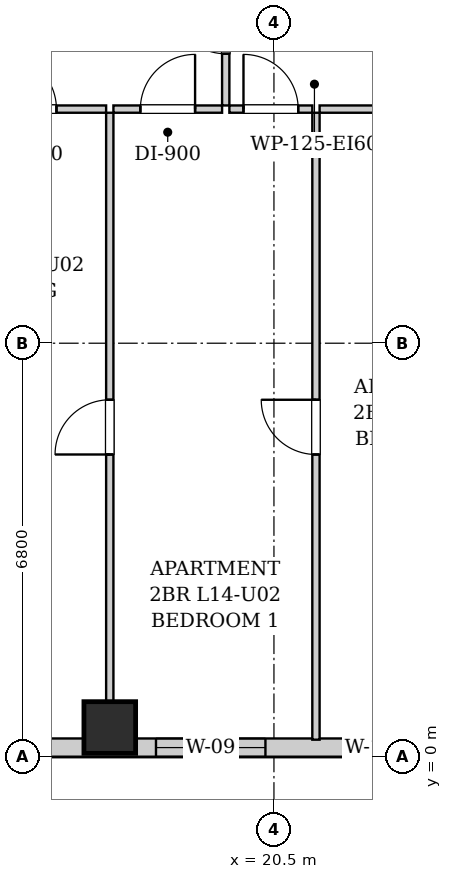
"""IFC4 building model, lengths in metres.
Left out: names, types, materials, properties, quantities, classifications, styles, units other than length and angle.
Written with IfcOpenShell. Run it as: python <this file> out.ifc"""

import sys

from ifc_helpers import new_model, si_unit, direction, frame, frame_2d, origin, origin_2d, place, context, subcontext, project, spatial, rectangle, extrude, element, fill, save


model = new_model("IFC4")
c1 = context("Model", 3, precision=1e-05, world=origin(), true_north=direction((0.0, 1.0)))
c2 = subcontext(c1, "Body", "Model", "MODEL_VIEW")
j1 = project(units=[si_unit("LENGTHUNIT", "METRE"), si_unit("PLANEANGLEUNIT", "RADIAN")], contexts=[c1])
p1 = place(None, origin())
s1 = spatial("IfcSite", under=j1, at=p1, CompositionType="ELEMENT")
p2 = place(p1, origin())
s2 = spatial("IfcBuilding", under=s1, at=p2, CompositionType="ELEMENT")
p3 = place(p2, frame((0.0, 0.0, 54.6)))
s3 = spatial("IfcBuildingStorey", under=s2, at=p3, CompositionType="ELEMENT", Elevation=54.6)
p4 = place(p3, frame((17.8, 0.48, 0.0), z_axis=(0.0, 0.0, 1.0), x_axis=(1.0, 0.0, 0.0)))
e1 = element("IfcColumn", 1, at=p4, inside=s3, PredefinedType="COLUMN", context=c2, shape_type="SweptSolid", body=[
    extrude(rectangle(XDim=0.85, YDim=0.85, at=origin_2d()), origin(), (0.0, 0.0, 1.0), 3.2),
])
p5 = place(p3, frame((44.0, 0.15, 0.0), z_axis=(0.0, 0.0, 1.0), x_axis=(-1.0, 0.0, 0.0)))
e2 = element("IfcWall", 2, at=p5, inside=s3, PredefinedType="SOLIDWALL", context=c2, shape_type="SweptSolid", body=[
    extrude(rectangle(XDim=27.55, YDim=0.3, at=frame_2d((13.775, 0.0))), origin(), (0.0, 0.0, 1.0), 1.975),
])
p6 = place(p5, frame((23.64, 0.0, 0.55)))
e3 = element("IfcOpeningElement", 3, at=p6, cuts=e2, PredefinedType="OPENING", context=c2, shape_type="SweptSolid", body=[
    extrude(rectangle(XDim=1.8, YDim=1.2, at=frame_2d((0.9, 0.6))), frame((0.0, 0.16, 0.0), z_axis=(0.0, -1.0, 0.0), x_axis=(1.0, 0.0, 0.0)), (0.0, 0.0, 1.0), 0.32),
])
p7 = place(p5, frame((21.5, 0.0, 0.55)))
e4 = element("IfcOpeningElement", 4, at=p7, cuts=e2, PredefinedType="OPENING", context=c2, shape_type="SweptSolid", body=[
    extrude(rectangle(XDim=0.85, YDim=1.2, at=frame_2d((0.425, 0.6))), frame((0.0, 0.16, 0.0), z_axis=(0.0, -1.0, 0.0), x_axis=(1.0, 0.0, 0.0)), (0.0, 0.0, 1.0), 0.32),
])
p8 = place(p5, frame((15.65, 0.0, 0.55)))
e5 = element("IfcOpeningElement", 5, at=p8, cuts=e2, PredefinedType="OPENING", context=c2, shape_type="SweptSolid", body=[
    extrude(rectangle(XDim=0.85, YDim=1.2, at=frame_2d((0.425, 0.6))), frame((0.0, 0.16, 0.0), z_axis=(0.0, -1.0, 0.0), x_axis=(1.0, 0.0, 0.0)), (0.0, 0.0, 1.0), 0.32),
])
p9 = place(p5, frame((12.875, 0.0, 0.55)))
e6 = element("IfcOpeningElement", 6, at=p9, cuts=e2, PredefinedType="OPENING", context=c2, shape_type="SweptSolid", body=[
    extrude(rectangle(XDim=1.8, YDim=1.2, at=frame_2d((0.9, 0.6))), frame((0.0, 0.16, 0.0), z_axis=(0.0, -1.0, 0.0), x_axis=(1.0, 0.0, 0.0)), (0.0, 0.0, 1.0), 0.32),
])
p10 = place(p5, frame((9.365, 0.0, 0.55)))
e7 = element("IfcOpeningElement", 7, at=p10, cuts=e2, PredefinedType="OPENING", context=c2, shape_type="SweptSolid", body=[
    extrude(rectangle(XDim=0.85, YDim=1.2, at=frame_2d((0.425, 0.6))), frame((0.0, 0.16, 0.0), z_axis=(0.0, -1.0, 0.0), x_axis=(1.0, 0.0, 0.0)), (0.0, 0.0, 1.0), 0.32),
])
p11 = place(p5, frame((6.477, 0.0, 0.55)))
e8 = element("IfcOpeningElement", 8, at=p11, cuts=e2, PredefinedType="OPENING", context=c2, shape_type="SweptSolid", body=[
    extrude(rectangle(XDim=1.8, YDim=1.2, at=frame_2d((0.9, 0.6))), frame((0.0, 0.16, 0.0), z_axis=(0.0, -1.0, 0.0), x_axis=(1.0, 0.0, 0.0)), (0.0, 0.0, 1.0), 0.32),
])
p12 = place(p5, frame((2.186, 0.0, 0.55)))
e9 = element("IfcOpeningElement", 9, at=p12, cuts=e2, PredefinedType="OPENING", context=c2, shape_type="SweptSolid", body=[
    extrude(rectangle(XDim=1.8, YDim=1.2, at=frame_2d((0.9, 0.6))), frame((0.0, 0.16, 0.0), z_axis=(0.0, -1.0, 0.0), x_axis=(1.0, 0.0, 0.0)), (0.0, 0.0, 1.0), 0.32),
])
p13 = place(p3, frame((19.707, 10.71, 0.0), z_axis=(0.0, 0.0, 1.0), x_axis=(0.0, 1.0, 0.0)))
e10 = element("IfcWall", 10, at=p13, inside=s3, PredefinedType="PARTITIONING", context=c2, shape_type="SweptSolid", body=[
    extrude(rectangle(XDim=2.6, YDim=0.12, at=frame_2d((1.3, 0.0))), origin(), (0.0, 0.0, 1.0), 2.94),
])
p14 = place(p13, frame((0.85, 0.0, 0.0)))
e11 = element("IfcOpeningElement", 11, at=p14, cuts=e10, PredefinedType="OPENING", context=c2, shape_type="SweptSolid", body=[
    extrude(rectangle(XDim=0.9, YDim=2.05, at=frame_2d((0.45, 1.025))), frame((0.0, 0.07, 0.0), z_axis=(0.0, -1.0, 0.0), x_axis=(1.0, 0.0, 0.0)), (0.0, 0.0, 1.0), 0.14),
])
p15 = place(p3, frame((15.207, 10.65, 0.0), z_axis=(0.0, 0.0, 1.0), x_axis=(1.0, 0.0, 0.0)))
e12 = element("IfcWall", 12, at=p15, inside=s3, PredefinedType="PARTITIONING", context=c2, shape_type="SweptSolid", body=[
    extrude(rectangle(XDim=2.533, YDim=0.12, at=frame_2d((1.267, 0.0))), origin(), (0.0, 0.0, 1.0), 2.94),
])
p16 = place(p15, frame((0.816, 0.0, 0.0)))
e13 = element("IfcOpeningElement", 13, at=p16, cuts=e12, PredefinedType="OPENING", context=c2, shape_type="SweptSolid", body=[
    extrude(rectangle(XDim=0.9, YDim=2.05, at=frame_2d((0.45, 1.025))), frame((0.0, 0.07, 0.0), z_axis=(0.0, -1.0, 0.0), x_axis=(1.0, 0.0, 0.0)), (0.0, 0.0, 1.0), 0.14),
])
p17 = place(p3, frame((17.86, 10.65, 0.0), z_axis=(0.0, 0.0, 1.0), x_axis=(1.0, 0.0, 0.0)))
e14 = element("IfcWall", 14, at=p17, inside=s3, PredefinedType="PARTITIONING", context=c2, shape_type="SweptSolid", body=[
    extrude(rectangle(XDim=1.787, YDim=0.12, at=frame_2d((0.894, 0.0))), origin(), (0.0, 0.0, 1.0), 2.94),
])
p18 = place(p17, frame((0.443, 0.0, 0.0)))
e15 = element("IfcOpeningElement", 15, at=p18, cuts=e14, PredefinedType="OPENING", context=c2, shape_type="SweptSolid", body=[
    extrude(rectangle(XDim=0.9, YDim=2.05, at=frame_2d((0.45, 1.025))), frame((0.0, 0.07, 0.0), z_axis=(0.0, -1.0, 0.0), x_axis=(1.0, 0.0, 0.0)), (0.0, 0.0, 1.0), 0.14),
])
p19 = place(p3, frame((19.767, 10.65, 0.0), z_axis=(0.0, 0.0, 1.0), x_axis=(1.0, 0.0, 0.0)))
e16 = element("IfcWall", 16, at=p19, inside=s3, PredefinedType="PARTITIONING", context=c2, shape_type="SweptSolid", body=[
    extrude(rectangle(XDim=1.364, YDim=0.12, at=frame_2d((0.682, 0.0))), origin(), (0.0, 0.0, 1.0), 2.94),
])
p20 = place(p19, frame((0.232, 0.0, 0.0)))
e17 = element("IfcOpeningElement", 17, at=p20, cuts=e16, PredefinedType="OPENING", context=c2, shape_type="SweptSolid", body=[
    extrude(rectangle(XDim=0.9, YDim=2.05, at=frame_2d((0.45, 1.025))), frame((0.0, 0.07, 0.0), z_axis=(0.0, -1.0, 0.0), x_axis=(1.0, 0.0, 0.0)), (0.0, 0.0, 1.0), 0.14),
])
p21 = place(p3, frame((21.251, 10.65, 0.0), z_axis=(0.0, 0.0, 1.0), x_axis=(1.0, 0.0, 0.0)))
e18 = element("IfcWall", 18, at=p21, inside=s3, PredefinedType="PARTITIONING", context=c2, shape_type="SweptSolid", body=[
    extrude(rectangle(XDim=3.27, YDim=0.12, at=frame_2d((1.635, 0.0))), origin(), (0.0, 0.0, 1.0), 2.94),
])
p22 = place(p21, frame((1.185, 0.0, 0.0)))
e19 = element("IfcOpeningElement", 19, at=p22, cuts=e18, PredefinedType="OPENING", context=c2, shape_type="SweptSolid", body=[
    extrude(rectangle(XDim=0.9, YDim=2.05, at=frame_2d((0.45, 1.025))), frame((0.0, 0.07, 0.0), z_axis=(0.0, -1.0, 0.0), x_axis=(1.0, 0.0, 0.0)), (0.0, 0.0, 1.0), 0.14),
])
p23 = place(p3, frame((17.8, 0.28, 0.0), z_axis=(0.0, 0.0, 1.0), x_axis=(0.0, 1.0, 0.0)))
e20 = element("IfcWall", 20, at=p23, inside=s3, PredefinedType="PARTITIONING", context=c2, shape_type="SweptSolid", body=[
    extrude(rectangle(XDim=10.31, YDim=0.12, at=frame_2d((5.155, 0.0))), origin(), (0.0, 0.0, 1.0), 2.232),
])
p24 = place(p23, frame((4.69, 0.0, 0.0)))
e21 = element("IfcOpeningElement", 21, at=p24, cuts=e20, PredefinedType="OPENING", context=c2, shape_type="SweptSolid", body=[
    extrude(rectangle(XDim=0.9, YDim=2.05, at=frame_2d((0.45, 1.025))), frame((0.0, 0.07, 0.0), z_axis=(0.0, -1.0, 0.0), x_axis=(1.0, 0.0, 0.0)), (0.0, 0.0, 1.0), 0.14),
])
p25 = place(p3, frame((21.191, 0.28, 0.0), z_axis=(0.0, 0.0, 1.0), x_axis=(0.0, 1.0, 0.0)))
e22 = element("IfcWall", 22, at=p25, inside=s3, PredefinedType="PARTITIONING", context=c2, shape_type="SweptSolid", body=[
    extrude(rectangle(XDim=10.31, YDim=0.12, at=frame_2d((5.155, 0.0))), origin(), (0.0, 0.0, 1.0), 2.94),
])
p26 = place(p25, frame((4.69, 0.0, 0.0)))
e23 = element("IfcOpeningElement", 23, at=p26, cuts=e22, PredefinedType="OPENING", context=c2, shape_type="SweptSolid", body=[
    extrude(rectangle(XDim=0.9, YDim=2.05, at=frame_2d((0.45, 1.025))), frame((0.0, 0.07, 0.0), z_axis=(0.0, -1.0, 0.0), x_axis=(1.0, 0.0, 0.0)), (0.0, 0.0, 1.0), 0.14),
])
p27 = place(p14, origin())
e24 = element("IfcDoor", 24, at=p27, inside=s3, OperationType="SINGLE_SWING_RIGHT", PredefinedType="DOOR", context=c2, shape_type="SweptSolid", body=[
    extrude(rectangle(XDim=0.9, YDim=2.05, at=frame_2d((0.45, 1.025))), frame((0.0, 0.025, 0.0), z_axis=(0.0, -1.0, 0.0), x_axis=(1.0, 0.0, 0.0)), (0.0, 0.0, 1.0), 0.05),
])
fill(e11, e24)
p28 = place(p16, origin())
e25 = element("IfcDoor", 25, at=p28, inside=s3, OperationType="SINGLE_SWING_LEFT", PredefinedType="DOOR", context=c2, shape_type="SweptSolid", body=[
    extrude(rectangle(XDim=0.9, YDim=2.05, at=frame_2d((0.45, 1.025))), frame((0.0, 0.025, 0.0), z_axis=(0.0, -1.0, 0.0), x_axis=(1.0, 0.0, 0.0)), (0.0, 0.0, 1.0), 0.05),
])
fill(e13, e25)
p29 = place(p18, origin())
e26 = element("IfcDoor", 26, at=p29, inside=s3, OperationType="SINGLE_SWING_RIGHT", PredefinedType="DOOR", context=c2, shape_type="SweptSolid", body=[
    extrude(rectangle(XDim=0.9, YDim=2.05, at=frame_2d((0.45, 1.025))), frame((0.0, 0.025, 0.0), z_axis=(0.0, -1.0, 0.0), x_axis=(1.0, 0.0, 0.0)), (0.0, 0.0, 1.0), 0.05),
])
fill(e15, e26)
p30 = place(p20, origin())
e27 = element("IfcDoor", 27, at=p30, inside=s3, OperationType="SINGLE_SWING_LEFT", PredefinedType="DOOR", context=c2, shape_type="SweptSolid", body=[
    extrude(rectangle(XDim=0.9, YDim=2.05, at=frame_2d((0.45, 1.025))), frame((0.0, 0.025, 0.0), z_axis=(0.0, -1.0, 0.0), x_axis=(1.0, 0.0, 0.0)), (0.0, 0.0, 1.0), 0.05),
])
fill(e17, e27)
p31 = place(p24, origin())
e28 = element("IfcDoor", 28, at=p31, inside=s3, OperationType="SINGLE_SWING_LEFT", PredefinedType="DOOR", context=c2, shape_type="SweptSolid", body=[
    extrude(rectangle(XDim=0.9, YDim=2.05, at=frame_2d((0.45, 1.025))), frame((0.0, 0.025, 0.0), z_axis=(0.0, -1.0, 0.0), x_axis=(1.0, 0.0, 0.0)), (0.0, 0.0, 1.0), 0.05),
])
fill(e21, e28)
p32 = place(p26, origin())
e29 = element("IfcDoor", 29, at=p32, inside=s3, OperationType="SINGLE_SWING_RIGHT", PredefinedType="DOOR", context=c2, shape_type="SweptSolid", body=[
    extrude(rectangle(XDim=0.9, YDim=2.05, at=frame_2d((0.45, 1.025))), frame((0.0, 0.025, 0.0), z_axis=(0.0, -1.0, 0.0), x_axis=(1.0, 0.0, 0.0)), (0.0, 0.0, 1.0), 0.05),
])
fill(e23, e29)
p33 = place(p6, origin())
e30 = element("IfcWindow", 30, at=p33, inside=s3, PartitioningType="DOUBLE_PANEL_VERTICAL", PredefinedType="WINDOW", context=c2, shape_type="SweptSolid", body=[
    extrude(rectangle(XDim=1.8, YDim=1.2, at=frame_2d((0.9, 0.6))), frame((0.0, 0.03, 0.0), z_axis=(0.0, -1.0, 0.0), x_axis=(1.0, 0.0, 0.0)), (0.0, 0.0, 1.0), 0.06),
])
fill(e3, e30)
p34 = place(p7, origin())
e31 = element("IfcWindow", 31, at=p34, inside=s3, PartitioningType="SINGLE_PANEL", PredefinedType="WINDOW", context=c2, shape_type="SweptSolid", body=[
    extrude(rectangle(XDim=0.85, YDim=1.2, at=frame_2d((0.425, 0.6))), frame((0.0, 0.03, 0.0), z_axis=(0.0, -1.0, 0.0), x_axis=(1.0, 0.0, 0.0)), (0.0, 0.0, 1.0), 0.06),
])
fill(e4, e31)
save(model, sys.argv[1])
